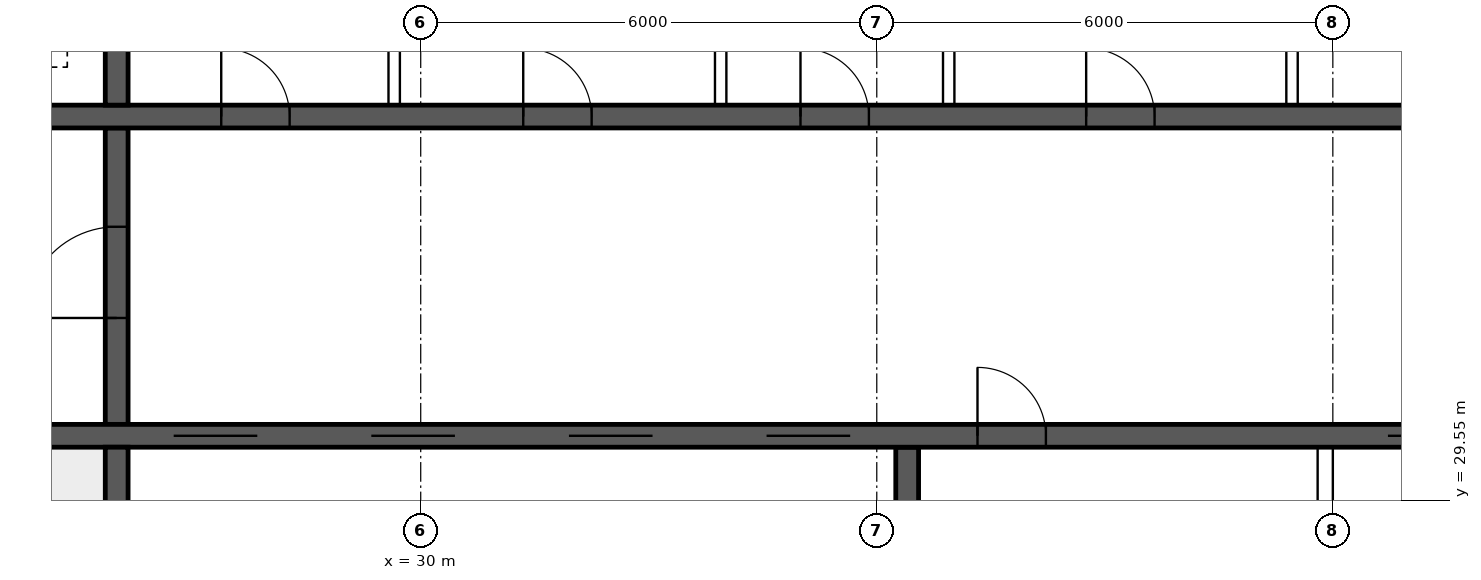
"""IFC4 building model, lengths in metres.
Left out: names, types, materials, properties, quantities, classifications, styles, units other than length and angle.
Written with IfcOpenShell. Run it as: python <this file> out.ifc"""

import sys

from ifc_helpers import new_model, si_unit, direction, frame, frame_2d, origin, place, context, subcontext, project, spatial, rectangle, extrude, element, fill, save


model = new_model("IFC4")
c1 = context("Model", 3, precision=1e-05, world=origin(), true_north=direction((0.0, 1.0)))
c2 = subcontext(c1, "Body", "Model", "MODEL_VIEW")
j1 = project(units=[si_unit("LENGTHUNIT", "METRE"), si_unit("PLANEANGLEUNIT", "RADIAN")], contexts=[c1])
p1 = place(None, origin())
s1 = spatial("IfcSite", under=j1, at=p1, CompositionType="ELEMENT")
p2 = place(p1, origin())
s2 = spatial("IfcBuilding", under=s1, at=p2, CompositionType="ELEMENT")
p3 = place(p2, frame((0.0, 0.0, 208.3)))
s3 = spatial("IfcBuildingStorey", under=s2, at=p3, CompositionType="ELEMENT", Elevation=208.3)
p4 = place(p3, frame((18.35, 30.4, 0.0), z_axis=(0.0, 0.0, 1.0), x_axis=(1.0, 0.0, 0.0)))
e1 = element("IfcWall", 1, at=p4, inside=s3, PredefinedType="SHEAR", context=c2, shape_type="SweptSolid", body=[
    extrude(rectangle(XDim=47.3, YDim=0.3, at=frame_2d((23.65, 0.0))), origin(), (0.0, 0.0, 1.0), 4.5),
])
p5 = place(p4, frame((0.4, 0.0, 0.0)))
e2 = element("IfcOpeningElement", 2, at=p5, cuts=e1, PredefinedType="OPENING", context=c2, shape_type="SweptSolid", body=[
    extrude(rectangle(XDim=1.0, YDim=2.1, at=frame_2d((0.5, 1.05))), frame((0.0, 0.16, 0.0), z_axis=(0.0, -1.0, 0.0), x_axis=(1.0, 0.0, 0.0)), (0.0, 0.0, 1.0), 0.32),
])
p6 = place(p4, frame((45.9, 0.0, 0.0)))
e3 = element("IfcOpeningElement", 3, at=p6, cuts=e1, PredefinedType="OPENING", context=c2, shape_type="SweptSolid", body=[
    extrude(rectangle(XDim=1.0, YDim=2.1, at=frame_2d((0.5, 1.05))), frame((0.0, 0.16, 0.0), z_axis=(0.0, -1.0, 0.0), x_axis=(1.0, 0.0, 0.0)), (0.0, 0.0, 1.0), 0.32),
])
p7 = place(p4, frame((8.4, 0.0, 0.0)))
e4 = element("IfcOpeningElement", 4, at=p7, cuts=e1, PredefinedType="OPENING", context=c2, shape_type="SweptSolid", body=[
    extrude(rectangle(XDim=1.1, YDim=2.1, at=frame_2d((0.55, 1.05))), frame((0.0, 0.16, 0.0), z_axis=(0.0, -1.0, 0.0), x_axis=(1.0, 0.0, 0.0)), (0.0, 0.0, 1.0), 0.32),
])
p8 = place(p4, frame((11.0, 0.0, 0.0)))
e5 = element("IfcOpeningElement", 5, at=p8, cuts=e1, PredefinedType="OPENING", context=c2, shape_type="SweptSolid", body=[
    extrude(rectangle(XDim=1.1, YDim=2.1, at=frame_2d((0.55, 1.05))), frame((0.0, 0.16, 0.0), z_axis=(0.0, -1.0, 0.0), x_axis=(1.0, 0.0, 0.0)), (0.0, 0.0, 1.0), 0.32),
])
p9 = place(p4, frame((13.6, 0.0, 0.0)))
e6 = element("IfcOpeningElement", 6, at=p9, cuts=e1, PredefinedType="OPENING", context=c2, shape_type="SweptSolid", body=[
    extrude(rectangle(XDim=1.1, YDim=2.1, at=frame_2d((0.55, 1.05))), frame((0.0, 0.16, 0.0), z_axis=(0.0, -1.0, 0.0), x_axis=(1.0, 0.0, 0.0)), (0.0, 0.0, 1.0), 0.32),
])
p10 = place(p4, frame((16.2, 0.0, 0.0)))
e7 = element("IfcOpeningElement", 7, at=p10, cuts=e1, PredefinedType="OPENING", context=c2, shape_type="SweptSolid", body=[
    extrude(rectangle(XDim=1.1, YDim=2.1, at=frame_2d((0.55, 1.05))), frame((0.0, 0.16, 0.0), z_axis=(0.0, -1.0, 0.0), x_axis=(1.0, 0.0, 0.0)), (0.0, 0.0, 1.0), 0.32),
])
p11 = place(p4, frame((18.975, 0.0, 0.0)))
e8 = element("IfcOpeningElement", 8, at=p11, cuts=e1, PredefinedType="OPENING", context=c2, shape_type="SweptSolid", body=[
    extrude(rectangle(XDim=0.9, YDim=2.1, at=frame_2d((0.45, 1.05))), frame((0.0, 0.16, 0.0), z_axis=(0.0, -1.0, 0.0), x_axis=(1.0, 0.0, 0.0)), (0.0, 0.0, 1.0), 0.32),
])
p12 = place(p4, frame((24.375, 0.0, 0.0)))
e9 = element("IfcOpeningElement", 9, at=p12, cuts=e1, PredefinedType="OPENING", context=c2, shape_type="SweptSolid", body=[
    extrude(rectangle(XDim=1.1, YDim=2.1, at=frame_2d((0.55, 1.05))), frame((0.0, 0.16, 0.0), z_axis=(0.0, -1.0, 0.0), x_axis=(1.0, 0.0, 0.0)), (0.0, 0.0, 1.0), 0.32),
])
p13 = place(p4, frame((27.125, 0.0, 0.0)))
e10 = element("IfcOpeningElement", 10, at=p13, cuts=e1, PredefinedType="OPENING", context=c2, shape_type="SweptSolid", body=[
    extrude(rectangle(XDim=1.1, YDim=2.1, at=frame_2d((0.55, 1.05))), frame((0.0, 0.16, 0.0), z_axis=(0.0, -1.0, 0.0), x_axis=(1.0, 0.0, 0.0)), (0.0, 0.0, 1.0), 0.32),
])
p14 = place(p4, frame((30.267, 0.0, 0.0)))
e11 = element("IfcOpeningElement", 11, at=p14, cuts=e1, PredefinedType="OPENING", context=c2, shape_type="SweptSolid", body=[
    extrude(rectangle(XDim=1.1, YDim=2.1, at=frame_2d((0.55, 1.05))), frame((0.0, 0.16, 0.0), z_axis=(0.0, -1.0, 0.0), x_axis=(1.0, 0.0, 0.0)), (0.0, 0.0, 1.0), 0.32),
])
p15 = place(p4, frame((33.8, 0.0, 0.0)))
e12 = element("IfcOpeningElement", 12, at=p15, cuts=e1, PredefinedType="OPENING", context=c2, shape_type="SweptSolid", body=[
    extrude(rectangle(XDim=1.1, YDim=2.1, at=frame_2d((0.55, 1.05))), frame((0.0, 0.16, 0.0), z_axis=(0.0, -1.0, 0.0), x_axis=(1.0, 0.0, 0.0)), (0.0, 0.0, 1.0), 0.32),
])
p16 = place(p4, frame((37.333, 0.0, 0.0)))
e13 = element("IfcOpeningElement", 13, at=p16, cuts=e1, PredefinedType="OPENING", context=c2, shape_type="SweptSolid", body=[
    extrude(rectangle(XDim=1.1, YDim=2.1, at=frame_2d((0.55, 1.05))), frame((0.0, 0.16, 0.0), z_axis=(0.0, -1.0, 0.0), x_axis=(1.0, 0.0, 0.0)), (0.0, 0.0, 1.0), 0.32),
])
p17 = place(p3, frame((18.35, 34.6, 0.0), z_axis=(0.0, 0.0, 1.0), x_axis=(1.0, 0.0, 0.0)))
e14 = element("IfcWall", 14, at=p17, inside=s3, PredefinedType="SHEAR", context=c2, shape_type="SweptSolid", body=[
    extrude(rectangle(XDim=47.3, YDim=0.3, at=frame_2d((23.65, 0.0))), origin(), (0.0, 0.0, 1.0), 4.5),
])
p18 = place(p17, frame((0.9, 0.0, 0.0)))
e15 = element("IfcOpeningElement", 15, at=p18, cuts=e14, PredefinedType="OPENING", context=c2, shape_type="SweptSolid", body=[
    extrude(rectangle(XDim=1.1, YDim=2.1, at=frame_2d((0.55, 1.05))), frame((0.0, 0.16, 0.0), z_axis=(0.0, -1.0, 0.0), x_axis=(1.0, 0.0, 0.0)), (0.0, 0.0, 1.0), 0.32),
])
p19 = place(p17, frame((45.3, 0.0, 0.0)))
e16 = element("IfcOpeningElement", 16, at=p19, cuts=e14, PredefinedType="OPENING", context=c2, shape_type="SweptSolid", body=[
    extrude(rectangle(XDim=1.1, YDim=2.1, at=frame_2d((0.55, 1.05))), frame((0.0, 0.16, 0.0), z_axis=(0.0, -1.0, 0.0), x_axis=(1.0, 0.0, 0.0)), (0.0, 0.0, 1.0), 0.32),
])
p20 = place(p17, frame((4.25, 0.0, 0.0)))
e17 = element("IfcOpeningElement", 17, at=p20, cuts=e14, PredefinedType="OPENING", context=c2, shape_type="SweptSolid", body=[
    extrude(rectangle(XDim=0.9, YDim=2.1, at=frame_2d((0.45, 1.05))), frame((0.0, 0.16, 0.0), z_axis=(0.0, -1.0, 0.0), x_axis=(1.0, 0.0, 0.0)), (0.0, 0.0, 1.0), 0.32),
])
p21 = place(p17, frame((42.15, 0.0, 0.0)))
e18 = element("IfcOpeningElement", 18, at=p21, cuts=e14, PredefinedType="OPENING", context=c2, shape_type="SweptSolid", body=[
    extrude(rectangle(XDim=0.9, YDim=2.1, at=frame_2d((0.45, 1.05))), frame((0.0, 0.16, 0.0), z_axis=(0.0, -1.0, 0.0), x_axis=(1.0, 0.0, 0.0)), (0.0, 0.0, 1.0), 0.32),
])
p22 = place(p17, frame((9.025, 0.0, 0.0)))
e19 = element("IfcOpeningElement", 19, at=p22, cuts=e14, PredefinedType="OPENING", context=c2, shape_type="SweptSolid", body=[
    extrude(rectangle(XDim=0.9, YDim=2.1, at=frame_2d((0.45, 1.05))), frame((0.0, 0.16, 0.0), z_axis=(0.0, -1.0, 0.0), x_axis=(1.0, 0.0, 0.0)), (0.0, 0.0, 1.0), 0.32),
])
p23 = place(p17, frame((12.999, 0.0, 0.0)))
e20 = element("IfcOpeningElement", 20, at=p23, cuts=e14, PredefinedType="OPENING", context=c2, shape_type="SweptSolid", body=[
    extrude(rectangle(XDim=0.9, YDim=2.1, at=frame_2d((0.45, 1.05))), frame((0.0, 0.16, 0.0), z_axis=(0.0, -1.0, 0.0), x_axis=(1.0, 0.0, 0.0)), (0.0, 0.0, 1.0), 0.32),
])
p24 = place(p17, frame((16.646, 0.0, 0.0)))
e21 = element("IfcOpeningElement", 21, at=p24, cuts=e14, PredefinedType="OPENING", context=c2, shape_type="SweptSolid", body=[
    extrude(rectangle(XDim=0.9, YDim=2.1, at=frame_2d((0.45, 1.05))), frame((0.0, 0.16, 0.0), z_axis=(0.0, -1.0, 0.0), x_axis=(1.0, 0.0, 0.0)), (0.0, 0.0, 1.0), 0.32),
])
p25 = place(p17, frame((20.405, 0.0, 0.0)))
e22 = element("IfcOpeningElement", 22, at=p25, cuts=e14, PredefinedType="OPENING", context=c2, shape_type="SweptSolid", body=[
    extrude(rectangle(XDim=0.9, YDim=2.1, at=frame_2d((0.45, 1.05))), frame((0.0, 0.16, 0.0), z_axis=(0.0, -1.0, 0.0), x_axis=(1.0, 0.0, 0.0)), (0.0, 0.0, 1.0), 0.32),
])
p26 = place(p17, frame((24.811, 0.0, 0.0)))
e23 = element("IfcOpeningElement", 23, at=p26, cuts=e14, PredefinedType="OPENING", context=c2, shape_type="SweptSolid", body=[
    extrude(rectangle(XDim=0.9, YDim=2.1, at=frame_2d((0.45, 1.05))), frame((0.0, 0.16, 0.0), z_axis=(0.0, -1.0, 0.0), x_axis=(1.0, 0.0, 0.0)), (0.0, 0.0, 1.0), 0.32),
])
p27 = place(p17, frame((27.608, 0.0, 0.0)))
e24 = element("IfcOpeningElement", 24, at=p27, cuts=e14, PredefinedType="OPENING", context=c2, shape_type="SweptSolid", body=[
    extrude(rectangle(XDim=0.9, YDim=2.1, at=frame_2d((0.45, 1.05))), frame((0.0, 0.16, 0.0), z_axis=(0.0, -1.0, 0.0), x_axis=(1.0, 0.0, 0.0)), (0.0, 0.0, 1.0), 0.32),
])
p28 = place(p17, frame((29.981, 0.0, 0.0)))
e25 = element("IfcOpeningElement", 25, at=p28, cuts=e14, PredefinedType="OPENING", context=c2, shape_type="SweptSolid", body=[
    extrude(rectangle(XDim=0.9, YDim=2.1, at=frame_2d((0.45, 1.05))), frame((0.0, 0.16, 0.0), z_axis=(0.0, -1.0, 0.0), x_axis=(1.0, 0.0, 0.0)), (0.0, 0.0, 1.0), 0.32),
])
p29 = place(p17, frame((35.451, 0.0, 0.0)))
e26 = element("IfcOpeningElement", 26, at=p29, cuts=e14, PredefinedType="OPENING", context=c2, shape_type="SweptSolid", body=[
    extrude(rectangle(XDim=0.9, YDim=2.1, at=frame_2d((0.45, 1.05))), frame((0.0, 0.16, 0.0), z_axis=(0.0, -1.0, 0.0), x_axis=(1.0, 0.0, 0.0)), (0.0, 0.0, 1.0), 0.32),
])
p30 = place(p3, frame((26.0, 26.15, 0.0), z_axis=(0.0, 0.0, 1.0), x_axis=(0.0, 1.0, 0.0)))
e27 = element("IfcWall", 27, at=p30, inside=s3, PredefinedType="SHEAR", context=c2, shape_type="SweptSolid", body=[
    extrude(rectangle(XDim=4.1, YDim=0.3, at=frame_2d((2.05, 0.0))), origin(), (0.0, 0.0, 1.0), 4.5),
])
p31 = place(p3, frame((26.0, 30.55, 0.0), z_axis=(0.0, 0.0, 1.0), x_axis=(0.0, 1.0, 0.0)))
e28 = element("IfcWall", 28, at=p31, inside=s3, PredefinedType="SHEAR", context=c2, shape_type="SweptSolid", body=[
    extrude(rectangle(XDim=3.9, YDim=0.3, at=frame_2d((1.95, 0.0))), origin(), (0.0, 0.0, 1.0), 4.5),
])
p32 = place(p31, frame((1.4, 0.0, 0.0)))
e29 = element("IfcOpeningElement", 29, at=p32, cuts=e28, PredefinedType="OPENING", context=c2, shape_type="SweptSolid", body=[
    extrude(rectangle(XDim=1.2, YDim=2.1, at=frame_2d((0.6, 1.05))), frame((0.0, 0.16, 0.0), z_axis=(0.0, -1.0, 0.0), x_axis=(1.0, 0.0, 0.0)), (0.0, 0.0, 1.0), 0.32),
])
p33 = place(p3, frame((26.0, 34.75, 0.0), z_axis=(0.0, 0.0, 1.0), x_axis=(0.0, 1.0, 0.0)))
e30 = element("IfcWall", 30, at=p33, inside=s3, PredefinedType="SHEAR", context=c2, shape_type="SweptSolid", body=[
    extrude(rectangle(XDim=3.1, YDim=0.3, at=frame_2d((1.55, 0.0))), origin(), (0.0, 0.0, 1.0), 4.5),
])
p34 = place(p3, frame((36.4, 26.15, 0.0), z_axis=(0.0, 0.0, 1.0), x_axis=(0.0, 1.0, 0.0)))
e31 = element("IfcWall", 31, at=p34, inside=s3, PredefinedType="SHEAR", context=c2, shape_type="SweptSolid", body=[
    extrude(rectangle(XDim=4.1, YDim=0.3, at=frame_2d((2.05, 0.0))), origin(), (0.0, 0.0, 1.0), 4.5),
])
for number, where, z_axis, x_axis in (
    (32, (29.651, 34.75, 0.0), (0.0, 0.0, 1.0), (0.0, 1.0, 0.0)),
    (33, (33.946, 34.75, 0.0), (0.0, 0.0, 1.0), (0.0, 1.0, 0.0)),
    (34, (36.946, 34.75, 0.0), (0.0, 0.0, 1.0), (0.0, 1.0, 0.0)),
    (35, (41.463, 34.75, 0.0), (0.0, 0.0, 1.0), (0.0, 1.0, 0.0)),
):
    element("IfcWall", number, at=place(p3, frame(where, z_axis=z_axis, x_axis=x_axis)), inside=s3, PredefinedType="SOLIDWALL", context=c2, shape_type="SweptSolid", body=[
        extrude(rectangle(XDim=3.1, YDim=0.15, at=frame_2d((1.55, 0.0))), origin(), (0.0, 0.0, 1.0), 4.25),
    ])
p35 = place(p3, frame((41.9, 26.15, 0.0), z_axis=(0.0, 0.0, 1.0), x_axis=(0.0, 1.0, 0.0)))
e36 = element("IfcWall", 36, at=p35, inside=s3, PredefinedType="SOLIDWALL", context=c2, shape_type="SweptSolid", body=[
    extrude(rectangle(XDim=4.1, YDim=0.2, at=frame_2d((2.05, 0.0))), origin(), (0.0, 0.0, 1.0), 4.25),
])
p36 = place(p32, origin())
e37 = element("IfcDoor", 37, at=p36, inside=s3, OperationType="SINGLE_SWING_LEFT", PredefinedType="DOOR", context=c2, shape_type="SweptSolid", body=[
    extrude(rectangle(XDim=1.2, YDim=2.1, at=frame_2d((0.6, 1.05))), frame((0.0, 0.025, 0.0), z_axis=(0.0, -1.0, 0.0), x_axis=(1.0, 0.0, 0.0)), (0.0, 0.0, 1.0), 0.05),
])
fill(e29, e37)
p37 = place(p22, origin())
e38 = element("IfcDoor", 38, at=p37, inside=s3, OperationType="SINGLE_SWING_LEFT", PredefinedType="DOOR", context=c2, shape_type="SweptSolid", body=[
    extrude(rectangle(XDim=0.9, YDim=2.1, at=frame_2d((0.45, 1.05))), frame((0.0, 0.025, 0.0), z_axis=(0.0, -1.0, 0.0), x_axis=(1.0, 0.0, 0.0)), (0.0, 0.0, 1.0), 0.05),
])
fill(e19, e38)
p38 = place(p23, origin())
e39 = element("IfcDoor", 39, at=p38, inside=s3, OperationType="SINGLE_SWING_LEFT", PredefinedType="DOOR", context=c2, shape_type="SweptSolid", body=[
    extrude(rectangle(XDim=0.9, YDim=2.1, at=frame_2d((0.45, 1.05))), frame((0.0, 0.025, 0.0), z_axis=(0.0, -1.0, 0.0), x_axis=(1.0, 0.0, 0.0)), (0.0, 0.0, 1.0), 0.05),
])
fill(e20, e39)
p39 = place(p24, origin())
e40 = element("IfcDoor", 40, at=p39, inside=s3, OperationType="SINGLE_SWING_LEFT", PredefinedType="DOOR", context=c2, shape_type="SweptSolid", body=[
    extrude(rectangle(XDim=0.9, YDim=2.1, at=frame_2d((0.45, 1.05))), frame((0.0, 0.025, 0.0), z_axis=(0.0, -1.0, 0.0), x_axis=(1.0, 0.0, 0.0)), (0.0, 0.0, 1.0), 0.05),
])
fill(e21, e40)
p40 = place(p25, origin())
e41 = element("IfcDoor", 41, at=p40, inside=s3, OperationType="SINGLE_SWING_LEFT", PredefinedType="DOOR", context=c2, shape_type="SweptSolid", body=[
    extrude(rectangle(XDim=0.9, YDim=2.1, at=frame_2d((0.45, 1.05))), frame((0.0, 0.025, 0.0), z_axis=(0.0, -1.0, 0.0), x_axis=(1.0, 0.0, 0.0)), (0.0, 0.0, 1.0), 0.05),
])
fill(e22, e41)
p41 = place(p7, origin())
e42 = element("IfcDoor", 42, at=p41, inside=s3, OperationType="DOUBLE_DOOR_SLIDING", PredefinedType="DOOR", context=c2, shape_type="SweptSolid", body=[
    extrude(rectangle(XDim=1.1, YDim=2.1, at=frame_2d((0.55, 1.05))), frame((0.0, 0.025, 0.0), z_axis=(0.0, -1.0, 0.0), x_axis=(1.0, 0.0, 0.0)), (0.0, 0.0, 1.0), 0.05),
])
fill(e4, e42)
p42 = place(p8, origin())
e43 = element("IfcDoor", 43, at=p42, inside=s3, OperationType="DOUBLE_DOOR_SLIDING", PredefinedType="DOOR", context=c2, shape_type="SweptSolid", body=[
    extrude(rectangle(XDim=1.1, YDim=2.1, at=frame_2d((0.55, 1.05))), frame((0.0, 0.025, 0.0), z_axis=(0.0, -1.0, 0.0), x_axis=(1.0, 0.0, 0.0)), (0.0, 0.0, 1.0), 0.05),
])
fill(e5, e43)
p43 = place(p9, origin())
e44 = element("IfcDoor", 44, at=p43, inside=s3, OperationType="DOUBLE_DOOR_SLIDING", PredefinedType="DOOR", context=c2, shape_type="SweptSolid", body=[
    extrude(rectangle(XDim=1.1, YDim=2.1, at=frame_2d((0.55, 1.05))), frame((0.0, 0.025, 0.0), z_axis=(0.0, -1.0, 0.0), x_axis=(1.0, 0.0, 0.0)), (0.0, 0.0, 1.0), 0.05),
])
fill(e6, e44)
p44 = place(p10, origin())
e45 = element("IfcDoor", 45, at=p44, inside=s3, OperationType="DOUBLE_DOOR_SLIDING", PredefinedType="DOOR", context=c2, shape_type="SweptSolid", body=[
    extrude(rectangle(XDim=1.1, YDim=2.1, at=frame_2d((0.55, 1.05))), frame((0.0, 0.025, 0.0), z_axis=(0.0, -1.0, 0.0), x_axis=(1.0, 0.0, 0.0)), (0.0, 0.0, 1.0), 0.05),
])
fill(e7, e45)
p45 = place(p11, origin())
e46 = element("IfcDoor", 46, at=p45, inside=s3, OperationType="SINGLE_SWING_LEFT", PredefinedType="DOOR", context=c2, shape_type="SweptSolid", body=[
    extrude(rectangle(XDim=0.9, YDim=2.1, at=frame_2d((0.45, 1.05))), frame((0.0, 0.025, 0.0), z_axis=(0.0, -1.0, 0.0), x_axis=(1.0, 0.0, 0.0)), (0.0, 0.0, 1.0), 0.05),
])
fill(e8, e46)
p46 = place(p12, origin())
e47 = element("IfcDoor", 47, at=p46, inside=s3, OperationType="DOUBLE_DOOR_SLIDING", PredefinedType="DOOR", context=c2, shape_type="SweptSolid", body=[
    extrude(rectangle(XDim=1.1, YDim=2.1, at=frame_2d((0.55, 1.05))), frame((0.0, 0.025, 0.0), z_axis=(0.0, -1.0, 0.0), x_axis=(1.0, 0.0, 0.0)), (0.0, 0.0, 1.0), 0.05),
])
fill(e9, e47)
save(model, sys.argv[1])
